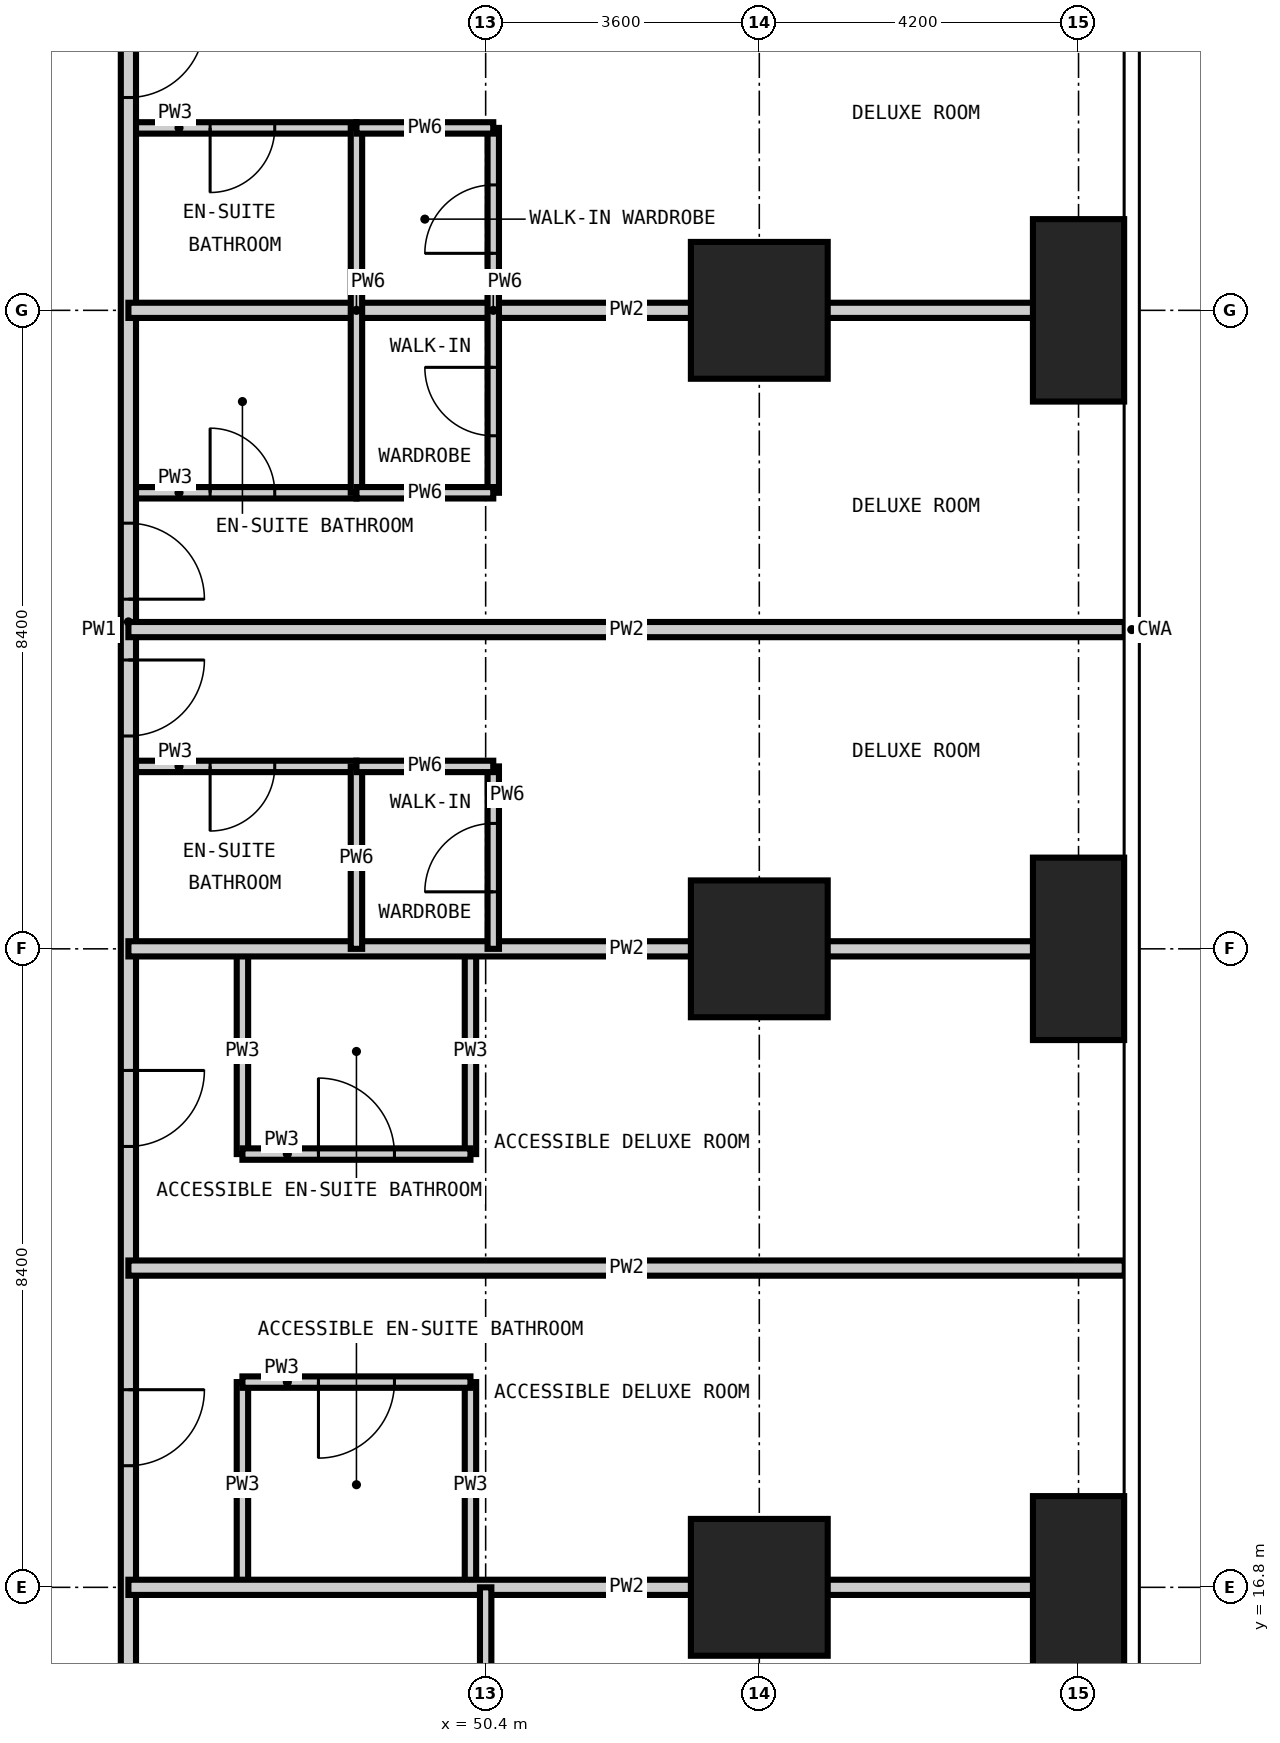
"""IFC4 building model, lengths in metres.
Left out: names, types, materials, properties, quantities, classifications, styles, units other than length and angle.
Written with IfcOpenShell. Run it as: python <this file> out.ifc"""

import sys

from ifc_helpers import new_model, si_unit, direction, frame, frame_2d, origin, origin_2d, place, context, subcontext, project, spatial, rectangle, extrude, element, fill, save


model = new_model("IFC4")
c1 = context("Model", 3, precision=1e-05, world=origin(), true_north=direction((0.0, 1.0)))
c2 = subcontext(c1, "Body", "Model", "MODEL_VIEW")
j1 = project(units=[si_unit("LENGTHUNIT", "METRE"), si_unit("PLANEANGLEUNIT", "RADIAN")], contexts=[c1])
p1 = place(None, origin())
s1 = spatial("IfcSite", under=j1, at=p1, CompositionType="ELEMENT")
p2 = place(p1, origin())
s2 = spatial("IfcBuilding", under=s1, at=p2, CompositionType="ELEMENT")
p3 = place(p2, frame((0.0, 0.0, 27.0)))
s3 = spatial("IfcBuildingStorey", under=s2, at=p3, CompositionType="ELEMENT", Elevation=27.0)
for number, where, z_axis, x_axis in (
    (1, (54.0, 16.8, -0.35), (0.0, 0.0, 1.0), (1.0, 0.0, 0.0)),
    (2, (54.0, 25.2, -0.35), (0.0, 0.0, 1.0), (1.0, 0.0, 0.0)),
    (3, (54.0, 33.6, -0.35), (0.0, 0.0, 1.0), (1.0, 0.0, 0.0)),
):
    element("IfcColumn", number, at=place(p3, frame(where, z_axis=z_axis, x_axis=x_axis)), inside=s3, PredefinedType="COLUMN", context=c2, shape_type="SweptSolid", body=[
        extrude(rectangle(XDim=1.8, YDim=1.8, at=origin_2d()), origin(), (0.0, 0.0, 1.0), 3.6),
    ])
for number, where, z_axis, x_axis in (
    (4, (58.2, 16.8, -0.35), (0.0, 0.0, 1.0), (1.0, 0.0, 0.0)),
    (5, (58.2, 25.2, -0.35), (0.0, 0.0, 1.0), (1.0, 0.0, 0.0)),
    (6, (58.2, 33.6, -0.35), (0.0, 0.0, 1.0), (1.0, 0.0, 0.0)),
):
    element("IfcColumn", number, at=place(p3, frame(where, z_axis=z_axis, x_axis=x_axis)), inside=s3, PredefinedType="COLUMN", context=c2, shape_type="SweptSolid", body=[
        extrude(rectangle(XDim=1.2, YDim=2.4, at=origin_2d()), origin(), (0.0, 0.0, 1.0), 3.6),
    ])
for number, where, z_axis, x_axis in (
    (7, (47.2, 16.8, 0.0), (0.0, 0.0, 1.0), (0.0, 1.0, 0.0)),
    (8, (47.2, 22.5, 0.0), (0.0, 0.0, 1.0), (0.0, 1.0, 0.0)),
    (9, (50.2, 16.8, 0.0), (0.0, 0.0, 1.0), (0.0, 1.0, 0.0)),
    (10, (50.2, 22.5, 0.0), (0.0, 0.0, 1.0), (0.0, 1.0, 0.0)),
):
    element("IfcWall", number, at=place(p3, frame(where, z_axis=z_axis, x_axis=x_axis)), inside=s3, PredefinedType="PARTITIONING", context=c2, shape_type="SweptSolid", body=[
        extrude(rectangle(XDim=2.7, YDim=0.15, at=frame_2d((1.35, 0.0))), origin(), (0.0, 0.0, 1.0), 3.25),
    ])
p4 = place(p3, frame((47.2, 19.5, 0.0), z_axis=(0.0, 0.0, 1.0), x_axis=(1.0, 0.0, 0.0)))
e11 = element("IfcWall", 11, at=p4, inside=s3, PredefinedType="PARTITIONING", context=c2, shape_type="SweptSolid", body=[
    extrude(rectangle(XDim=3.0, YDim=0.15, at=frame_2d((1.5, 0.0))), origin(), (0.0, 0.0, 1.0), 3.25),
])
p5 = place(p4, frame((1.0, 0.0, 0.0)))
e12 = element("IfcOpeningElement", 12, at=p5, cuts=e11, PredefinedType="OPENING", context=c2, shape_type="SweptSolid", body=[
    extrude(rectangle(XDim=1.0, YDim=2.1, at=frame_2d((0.5, 1.05))), frame((0.0, 0.085, 0.0), z_axis=(0.0, -1.0, 0.0), x_axis=(1.0, 0.0, 0.0)), (0.0, 0.0, 1.0), 0.17),
])
p6 = place(p3, frame((47.2, 22.5, 0.0), z_axis=(0.0, 0.0, 1.0), x_axis=(1.0, 0.0, 0.0)))
e13 = element("IfcWall", 13, at=p6, inside=s3, PredefinedType="PARTITIONING", context=c2, shape_type="SweptSolid", body=[
    extrude(rectangle(XDim=3.0, YDim=0.15, at=frame_2d((1.5, 0.0))), origin(), (0.0, 0.0, 1.0), 3.25),
])
p7 = place(p6, frame((1.0, 0.0, 0.0)))
e14 = element("IfcOpeningElement", 14, at=p7, cuts=e13, PredefinedType="OPENING", context=c2, shape_type="SweptSolid", body=[
    extrude(rectangle(XDim=1.0, YDim=2.1, at=frame_2d((0.5, 1.05))), frame((0.0, 0.085, 0.0), z_axis=(0.0, -1.0, 0.0), x_axis=(1.0, 0.0, 0.0)), (0.0, 0.0, 1.0), 0.17),
])
p8 = place(p3, frame((45.7, 27.6, 0.0), z_axis=(0.0, 0.0, 1.0), x_axis=(1.0, 0.0, 0.0)))
e15 = element("IfcWall", 15, at=p8, inside=s3, PredefinedType="PARTITIONING", context=c2, shape_type="SweptSolid", body=[
    extrude(rectangle(XDim=3.0, YDim=0.15, at=frame_2d((1.5, 0.0))), origin(), (0.0, 0.0, 1.0), 3.25),
])
p9 = place(p8, frame((1.075, 0.0, 0.0)))
e16 = element("IfcOpeningElement", 16, at=p9, cuts=e15, PredefinedType="OPENING", context=c2, shape_type="SweptSolid", body=[
    extrude(rectangle(XDim=0.85, YDim=2.1, at=frame_2d((0.425, 1.05))), frame((0.0, 0.085, 0.0), z_axis=(0.0, -1.0, 0.0), x_axis=(1.0, 0.0, 0.0)), (0.0, 0.0, 1.0), 0.17),
])
p10 = place(p3, frame((45.7, 31.2, 0.0), z_axis=(0.0, 0.0, 1.0), x_axis=(1.0, 0.0, 0.0)))
e17 = element("IfcWall", 17, at=p10, inside=s3, PredefinedType="PARTITIONING", context=c2, shape_type="SweptSolid", body=[
    extrude(rectangle(XDim=3.0, YDim=0.15, at=frame_2d((1.5, 0.0))), origin(), (0.0, 0.0, 1.0), 3.25),
])
p11 = place(p10, frame((1.075, 0.0, 0.0)))
e18 = element("IfcOpeningElement", 18, at=p11, cuts=e17, PredefinedType="OPENING", context=c2, shape_type="SweptSolid", body=[
    extrude(rectangle(XDim=0.85, YDim=2.1, at=frame_2d((0.425, 1.05))), frame((0.0, 0.085, 0.0), z_axis=(0.0, -1.0, 0.0), x_axis=(1.0, 0.0, 0.0)), (0.0, 0.0, 1.0), 0.17),
])
p12 = place(p3, frame((45.7, 36.0, 0.0), z_axis=(0.0, 0.0, 1.0), x_axis=(1.0, 0.0, 0.0)))
e19 = element("IfcWall", 19, at=p12, inside=s3, PredefinedType="PARTITIONING", context=c2, shape_type="SweptSolid", body=[
    extrude(rectangle(XDim=3.0, YDim=0.15, at=frame_2d((1.5, 0.0))), origin(), (0.0, 0.0, 1.0), 3.25),
])
p13 = place(p12, frame((1.075, 0.0, 0.0)))
e20 = element("IfcOpeningElement", 20, at=p13, cuts=e19, PredefinedType="OPENING", context=c2, shape_type="SweptSolid", body=[
    extrude(rectangle(XDim=0.85, YDim=2.1, at=frame_2d((0.425, 1.05))), frame((0.0, 0.085, 0.0), z_axis=(0.0, -1.0, 0.0), x_axis=(1.0, 0.0, 0.0)), (0.0, 0.0, 1.0), 0.17),
])
p14 = place(p3, frame((45.7, 46.0, 0.0), z_axis=(0.0, 0.0, 1.0), x_axis=(0.0, -1.0, 0.0)))
e21 = element("IfcWall", 21, at=p14, inside=s3, PredefinedType="PARTITIONING", context=c2, shape_type="SweptSolid", body=[
    extrude(rectangle(XDim=32.6, YDim=0.2, at=frame_2d((16.3, 0.0))), origin(), (0.0, 0.0, 1.0), 3.25),
])
p15 = place(p14, frame((26.6, 0.0, 0.0)))
e22 = element("IfcOpeningElement", 22, at=p15, cuts=e21, PredefinedType="OPENING", context=c2, shape_type="SweptSolid", body=[
    extrude(rectangle(XDim=1.0, YDim=2.2, at=frame_2d((0.5, 1.1))), frame((0.0, 0.11, 0.0), z_axis=(0.0, -1.0, 0.0), x_axis=(1.0, 0.0, 0.0)), (0.0, 0.0, 1.0), 0.22),
])
p16 = place(p14, frame((22.4, 0.0, 0.0)))
e23 = element("IfcOpeningElement", 23, at=p16, cuts=e21, PredefinedType="OPENING", context=c2, shape_type="SweptSolid", body=[
    extrude(rectangle(XDim=1.0, YDim=2.2, at=frame_2d((0.5, 1.1))), frame((0.0, 0.11, 0.0), z_axis=(0.0, -1.0, 0.0), x_axis=(1.0, 0.0, 0.0)), (0.0, 0.0, 1.0), 0.22),
])
p17 = place(p14, frame((17.0, 0.0, 0.0)))
e24 = element("IfcOpeningElement", 24, at=p17, cuts=e21, PredefinedType="OPENING", context=c2, shape_type="SweptSolid", body=[
    extrude(rectangle(XDim=1.0, YDim=2.2, at=frame_2d((0.5, 1.1))), frame((0.0, 0.11, 0.0), z_axis=(0.0, -1.0, 0.0), x_axis=(1.0, 0.0, 0.0)), (0.0, 0.0, 1.0), 0.22),
])
p18 = place(p14, frame((15.2, 0.0, 0.0)))
e25 = element("IfcOpeningElement", 25, at=p18, cuts=e21, PredefinedType="OPENING", context=c2, shape_type="SweptSolid", body=[
    extrude(rectangle(XDim=1.0, YDim=2.2, at=frame_2d((0.5, 1.1))), frame((0.0, 0.11, 0.0), z_axis=(0.0, -1.0, 0.0), x_axis=(1.0, 0.0, 0.0)), (0.0, 0.0, 1.0), 0.22),
])
p19 = place(p14, frame((8.6, 0.0, 0.0)))
e26 = element("IfcOpeningElement", 26, at=p19, cuts=e21, PredefinedType="OPENING", context=c2, shape_type="SweptSolid", body=[
    extrude(rectangle(XDim=1.0, YDim=2.2, at=frame_2d((0.5, 1.1))), frame((0.0, 0.11, 0.0), z_axis=(0.0, -1.0, 0.0), x_axis=(1.0, 0.0, 0.0)), (0.0, 0.0, 1.0), 0.22),
])
p20 = place(p14, frame((6.8, 0.0, 0.0)))
e27 = element("IfcOpeningElement", 27, at=p20, cuts=e21, PredefinedType="OPENING", context=c2, shape_type="SweptSolid", body=[
    extrude(rectangle(XDim=1.0, YDim=2.2, at=frame_2d((0.5, 1.1))), frame((0.0, 0.11, 0.0), z_axis=(0.0, -1.0, 0.0), x_axis=(1.0, 0.0, 0.0)), (0.0, 0.0, 1.0), 0.22),
])
p21 = place(p14, frame((30.4, 0.0, 0.0)))
e28 = element("IfcOpeningElement", 28, at=p21, cuts=e21, PredefinedType="OPENING", context=c2, shape_type="SweptSolid", body=[
    extrude(rectangle(XDim=1.0, YDim=2.2, at=frame_2d((0.5, 1.1))), frame((0.0, 0.11, 0.0), z_axis=(0.0, -1.0, 0.0), x_axis=(1.0, 0.0, 0.0)), (0.0, 0.0, 1.0), 0.22),
])
p22 = place(p14, frame((1.5, 0.0, 0.0)))
e29 = element("IfcOpeningElement", 29, at=p22, cuts=e21, PredefinedType="OPENING", context=c2, shape_type="SweptSolid", body=[
    extrude(rectangle(XDim=1.0, YDim=2.2, at=frame_2d((0.5, 1.1))), frame((0.0, 0.11, 0.0), z_axis=(0.0, -1.0, 0.0), x_axis=(1.0, 0.0, 0.0)), (0.0, 0.0, 1.0), 0.22),
])
for number, where, z_axis, x_axis in (
    (30, (45.7, 16.8, 0.0), (0.0, 0.0, 1.0), (1.0, 0.0, 0.0)),
    (31, (45.7, 21.0, 0.0), (0.0, 0.0, 1.0), (1.0, 0.0, 0.0)),
    (32, (45.7, 25.2, 0.0), (0.0, 0.0, 1.0), (1.0, 0.0, 0.0)),
    (33, (45.7, 29.4, 0.0), (0.0, 0.0, 1.0), (1.0, 0.0, 0.0)),
    (34, (45.7, 33.6, 0.0), (0.0, 0.0, 1.0), (1.0, 0.0, 0.0)),
):
    element("IfcWall", number, at=place(p3, frame(where, z_axis=z_axis, x_axis=x_axis)), inside=s3, PredefinedType="PARTITIONING", context=c2, shape_type="SweptSolid", body=[
        extrude(rectangle(XDim=13.108, YDim=0.2, at=frame_2d((6.554, 0.0))), origin(), (0.0, 0.0, 1.0), 3.25),
    ])
p23 = place(p3, frame((48.7, 25.2, 0.0), z_axis=(0.0, 0.0, 1.0), x_axis=(0.0, 1.0, 0.0)))
e35 = element("IfcWall", 35, at=p23, inside=s3, PredefinedType="PARTITIONING", context=c2, shape_type="SweptSolid", body=[
    extrude(rectangle(XDim=2.4, YDim=0.15, at=frame_2d((1.2, 0.0))), origin(), (0.0, 0.0, 1.0), 3.25),
])
p24 = place(p3, frame((48.7, 31.2, 0.0), z_axis=(0.0, 0.0, 1.0), x_axis=(0.0, 1.0, 0.0)))
e36 = element("IfcWall", 36, at=p24, inside=s3, PredefinedType="PARTITIONING", context=c2, shape_type="SweptSolid", body=[
    extrude(rectangle(XDim=4.8, YDim=0.15, at=frame_2d((2.4, 0.0))), origin(), (0.0, 0.0, 1.0), 3.25),
])
p25 = place(p3, frame((50.4, -0.008, 0.0), z_axis=(0.0, 0.0, 1.0), x_axis=(0.0, 1.0, 0.0)))
e37 = element("IfcWall", 37, at=p25, inside=s3, PredefinedType="PARTITIONING", context=c2, shape_type="SweptSolid", body=[
    extrude(rectangle(XDim=16.808, YDim=0.15, at=frame_2d((8.404, 0.0))), origin(), (0.0, 0.0, 1.0), 3.25),
])
p26 = place(p25, frame((1.958, 0.0, 0.0)))
e38 = element("IfcOpeningElement", 38, at=p26, cuts=e37, PredefinedType="OPENING", context=c2, shape_type="SweptSolid", body=[
    extrude(rectangle(XDim=0.9, YDim=2.1, at=frame_2d((0.45, 1.05))), frame((0.0, 0.085, 0.0), z_axis=(0.0, -1.0, 0.0), x_axis=(1.0, 0.0, 0.0)), (0.0, 0.0, 1.0), 0.17),
])
p27 = place(p25, frame((12.158, 0.0, 0.0)))
e39 = element("IfcOpeningElement", 39, at=p27, cuts=e37, PredefinedType="OPENING", context=c2, shape_type="SweptSolid", body=[
    extrude(rectangle(XDim=0.9, YDim=2.1, at=frame_2d((0.45, 1.05))), frame((0.0, 0.085, 0.0), z_axis=(0.0, -1.0, 0.0), x_axis=(1.0, 0.0, 0.0)), (0.0, 0.0, 1.0), 0.17),
])
p28 = place(p3, frame((50.5, 25.2, 0.0), z_axis=(0.0, 0.0, 1.0), x_axis=(0.0, 1.0, 0.0)))
e40 = element("IfcWall", 40, at=p28, inside=s3, PredefinedType="PARTITIONING", context=c2, shape_type="SweptSolid", body=[
    extrude(rectangle(XDim=2.4, YDim=0.15, at=frame_2d((1.2, 0.0))), origin(), (0.0, 0.0, 1.0), 3.25),
])
p29 = place(p28, frame((0.75, 0.0, 0.0)))
e41 = element("IfcOpeningElement", 41, at=p29, cuts=e40, PredefinedType="OPENING", context=c2, shape_type="SweptSolid", body=[
    extrude(rectangle(XDim=0.9, YDim=2.1, at=frame_2d((0.45, 1.05))), frame((0.0, 0.085, 0.0), z_axis=(0.0, -1.0, 0.0), x_axis=(1.0, 0.0, 0.0)), (0.0, 0.0, 1.0), 0.17),
])
p30 = place(p3, frame((50.5, 31.2, 0.0), z_axis=(0.0, 0.0, 1.0), x_axis=(0.0, 1.0, 0.0)))
e42 = element("IfcWall", 42, at=p30, inside=s3, PredefinedType="PARTITIONING", context=c2, shape_type="SweptSolid", body=[
    extrude(rectangle(XDim=4.8, YDim=0.15, at=frame_2d((2.4, 0.0))), origin(), (0.0, 0.0, 1.0), 3.25),
])
p31 = place(p30, frame((0.75, 0.0, 0.0)))
e43 = element("IfcOpeningElement", 43, at=p31, cuts=e42, PredefinedType="OPENING", context=c2, shape_type="SweptSolid", body=[
    extrude(rectangle(XDim=0.9, YDim=2.1, at=frame_2d((0.45, 1.05))), frame((0.0, 0.085, 0.0), z_axis=(0.0, -1.0, 0.0), x_axis=(1.0, 0.0, 0.0)), (0.0, 0.0, 1.0), 0.17),
])
p32 = place(p30, frame((3.15, 0.0, 0.0)))
e44 = element("IfcOpeningElement", 44, at=p32, cuts=e42, PredefinedType="OPENING", context=c2, shape_type="SweptSolid", body=[
    extrude(rectangle(XDim=0.9, YDim=2.1, at=frame_2d((0.45, 1.05))), frame((0.0, 0.085, 0.0), z_axis=(0.0, -1.0, 0.0), x_axis=(1.0, 0.0, 0.0)), (0.0, 0.0, 1.0), 0.17),
])
for number, where, z_axis, x_axis in (
    (45, (48.7, 27.6, 0.0), (0.0, 0.0, 1.0), (1.0, 0.0, 0.0)),
    (46, (48.7, 31.2, 0.0), (0.0, 0.0, 1.0), (1.0, 0.0, 0.0)),
    (47, (48.7, 36.0, 0.0), (0.0, 0.0, 1.0), (1.0, 0.0, 0.0)),
):
    element("IfcWall", number, at=place(p3, frame(where, z_axis=z_axis, x_axis=x_axis)), inside=s3, PredefinedType="PARTITIONING", context=c2, shape_type="SweptSolid", body=[
        extrude(rectangle(XDim=1.8, YDim=0.15, at=frame_2d((0.9, 0.0))), origin(), (0.0, 0.0, 1.0), 3.25),
    ])
p33 = place(p15, origin())
e48 = element("IfcDoor", 48, at=p33, inside=s3, OperationType="SINGLE_SWING_LEFT", PredefinedType="DOOR", context=c2, shape_type="SweptSolid", body=[
    extrude(rectangle(XDim=1.0, YDim=2.2, at=frame_2d((0.5, 1.1))), frame((0.0, 0.025, 0.0), z_axis=(0.0, -1.0, 0.0), x_axis=(1.0, 0.0, 0.0)), (0.0, 0.0, 1.0), 0.05),
])
fill(e22, e48)
p34 = place(p5, frame((1.0, 0.0, 0.0), z_axis=(0.0, 0.0, 1.0), x_axis=(-1.0, 0.0, 0.0)))
e49 = element("IfcDoor", 49, at=p34, inside=s3, OperationType="SINGLE_SWING_RIGHT", PredefinedType="DOOR", context=c2, shape_type="SweptSolid", body=[
    extrude(rectangle(XDim=1.0, YDim=2.1, at=frame_2d((0.5, 1.05))), frame((0.0, 0.025, 0.0), z_axis=(0.0, -1.0, 0.0), x_axis=(1.0, 0.0, 0.0)), (0.0, 0.0, 1.0), 0.05),
])
fill(e12, e49)
p35 = place(p16, origin())
e50 = element("IfcDoor", 50, at=p35, inside=s3, OperationType="SINGLE_SWING_LEFT", PredefinedType="DOOR", context=c2, shape_type="SweptSolid", body=[
    extrude(rectangle(XDim=1.0, YDim=2.2, at=frame_2d((0.5, 1.1))), frame((0.0, 0.025, 0.0), z_axis=(0.0, -1.0, 0.0), x_axis=(1.0, 0.0, 0.0)), (0.0, 0.0, 1.0), 0.05),
])
fill(e23, e50)
p36 = place(p7, origin())
e51 = element("IfcDoor", 51, at=p36, inside=s3, OperationType="SINGLE_SWING_LEFT", PredefinedType="DOOR", context=c2, shape_type="SweptSolid", body=[
    extrude(rectangle(XDim=1.0, YDim=2.1, at=frame_2d((0.5, 1.05))), frame((0.0, 0.025, 0.0), z_axis=(0.0, -1.0, 0.0), x_axis=(1.0, 0.0, 0.0)), (0.0, 0.0, 1.0), 0.05),
])
fill(e14, e51)
p37 = place(p17, origin())
e52 = element("IfcDoor", 52, at=p37, inside=s3, OperationType="SINGLE_SWING_LEFT", PredefinedType="DOOR", context=c2, shape_type="SweptSolid", body=[
    extrude(rectangle(XDim=1.0, YDim=2.2, at=frame_2d((0.5, 1.1))), frame((0.0, 0.025, 0.0), z_axis=(0.0, -1.0, 0.0), x_axis=(1.0, 0.0, 0.0)), (0.0, 0.0, 1.0), 0.05),
])
fill(e24, e52)
p38 = place(p9, frame((0.85, 0.0, 0.0), z_axis=(0.0, 0.0, 1.0), x_axis=(-1.0, 0.0, 0.0)))
e53 = element("IfcDoor", 53, at=p38, inside=s3, OperationType="SINGLE_SWING_RIGHT", PredefinedType="DOOR", context=c2, shape_type="SweptSolid", body=[
    extrude(rectangle(XDim=0.85, YDim=2.1, at=frame_2d((0.425, 1.05))), frame((0.0, 0.025, 0.0), z_axis=(0.0, -1.0, 0.0), x_axis=(1.0, 0.0, 0.0)), (0.0, 0.0, 1.0), 0.05),
])
fill(e16, e53)
p39 = place(p29, origin())
e54 = element("IfcDoor", 54, at=p39, inside=s3, OperationType="SINGLE_SWING_LEFT", PredefinedType="DOOR", context=c2, shape_type="SweptSolid", body=[
    extrude(rectangle(XDim=0.9, YDim=2.1, at=frame_2d((0.45, 1.05))), frame((0.0, 0.025, 0.0), z_axis=(0.0, -1.0, 0.0), x_axis=(1.0, 0.0, 0.0)), (0.0, 0.0, 1.0), 0.05),
])
fill(e41, e54)
p40 = place(p18, origin())
e55 = element("IfcDoor", 55, at=p40, inside=s3, OperationType="SINGLE_SWING_RIGHT", PredefinedType="DOOR", context=c2, shape_type="SweptSolid", body=[
    extrude(rectangle(XDim=1.0, YDim=2.2, at=frame_2d((0.5, 1.1))), frame((0.0, 0.025, 0.0), z_axis=(0.0, -1.0, 0.0), x_axis=(1.0, 0.0, 0.0)), (0.0, 0.0, 1.0), 0.05),
])
fill(e25, e55)
p41 = place(p11, origin())
e56 = element("IfcDoor", 56, at=p41, inside=s3, OperationType="SINGLE_SWING_LEFT", PredefinedType="DOOR", context=c2, shape_type="SweptSolid", body=[
    extrude(rectangle(XDim=0.85, YDim=2.1, at=frame_2d((0.425, 1.05))), frame((0.0, 0.025, 0.0), z_axis=(0.0, -1.0, 0.0), x_axis=(1.0, 0.0, 0.0)), (0.0, 0.0, 1.0), 0.05),
])
fill(e18, e56)
p42 = place(p31, origin())
e57 = element("IfcDoor", 57, at=p42, inside=s3, OperationType="SINGLE_SWING_RIGHT", PredefinedType="DOOR", context=c2, shape_type="SweptSolid", body=[
    extrude(rectangle(XDim=0.9, YDim=2.1, at=frame_2d((0.45, 1.05))), frame((0.0, 0.025, 0.0), z_axis=(0.0, -1.0, 0.0), x_axis=(1.0, 0.0, 0.0)), (0.0, 0.0, 1.0), 0.05),
])
fill(e43, e57)
p43 = place(p19, origin())
e58 = element("IfcDoor", 58, at=p43, inside=s3, OperationType="SINGLE_SWING_LEFT", PredefinedType="DOOR", context=c2, shape_type="SweptSolid", body=[
    extrude(rectangle(XDim=1.0, YDim=2.2, at=frame_2d((0.5, 1.1))), frame((0.0, 0.025, 0.0), z_axis=(0.0, -1.0, 0.0), x_axis=(1.0, 0.0, 0.0)), (0.0, 0.0, 1.0), 0.05),
])
fill(e26, e58)
p44 = place(p13, frame((0.85, 0.0, 0.0), z_axis=(0.0, 0.0, 1.0), x_axis=(-1.0, 0.0, 0.0)))
e59 = element("IfcDoor", 59, at=p44, inside=s3, OperationType="SINGLE_SWING_RIGHT", PredefinedType="DOOR", context=c2, shape_type="SweptSolid", body=[
    extrude(rectangle(XDim=0.85, YDim=2.1, at=frame_2d((0.425, 1.05))), frame((0.0, 0.025, 0.0), z_axis=(0.0, -1.0, 0.0), x_axis=(1.0, 0.0, 0.0)), (0.0, 0.0, 1.0), 0.05),
])
fill(e20, e59)
p45 = place(p32, origin())
e60 = element("IfcDoor", 60, at=p45, inside=s3, OperationType="SINGLE_SWING_LEFT", PredefinedType="DOOR", context=c2, shape_type="SweptSolid", body=[
    extrude(rectangle(XDim=0.9, YDim=2.1, at=frame_2d((0.45, 1.05))), frame((0.0, 0.025, 0.0), z_axis=(0.0, -1.0, 0.0), x_axis=(1.0, 0.0, 0.0)), (0.0, 0.0, 1.0), 0.05),
])
fill(e44, e60)
save(model, sys.argv[1])
